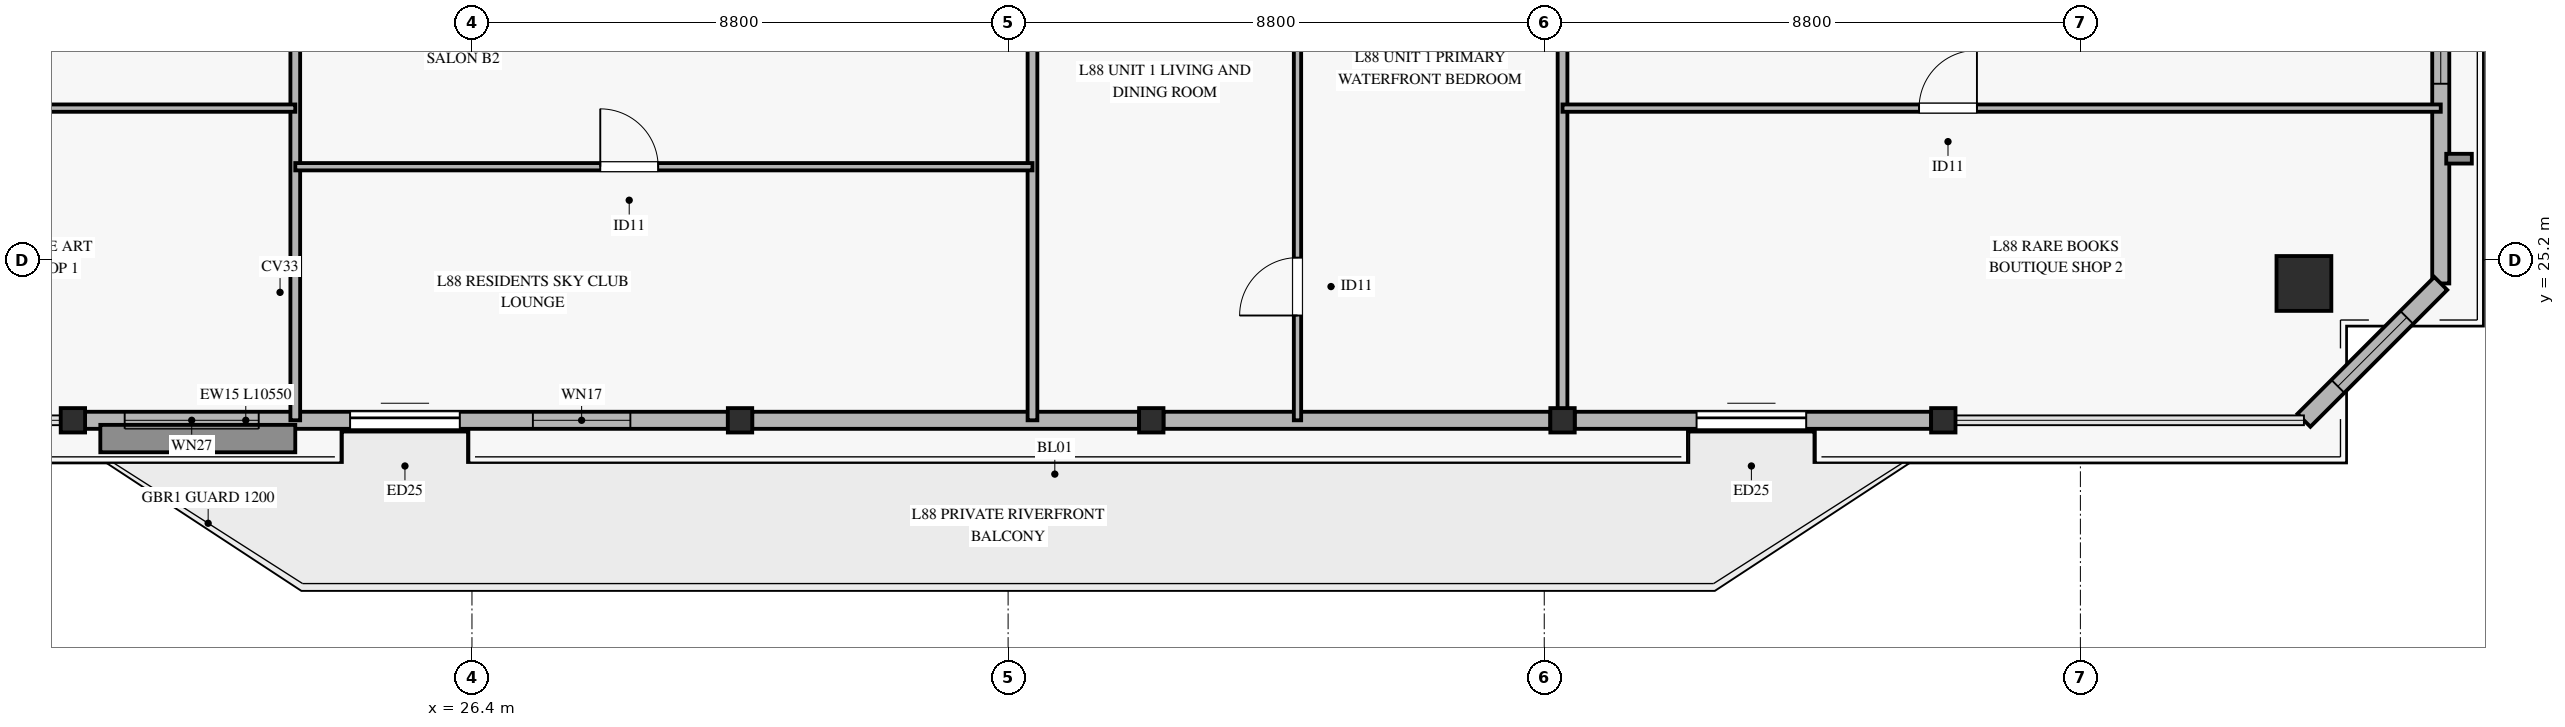
"""IFC4 building model, lengths in metres.
Left out: names, types, materials, properties, quantities, classifications, styles, units other than length and angle.
Written with IfcOpenShell. Run it as: python <this file> out.ifc"""

import sys

from ifc_helpers import new_model, si_unit, direction, frame, frame_2d, origin, origin_2d, place, context, subcontext, project, spatial, rectangle, hollow_rectangle, extrude, source, transform, mapped, element, fill, save


model = new_model("IFC4")
c1 = context("Model", 3, precision=1e-05, world=origin(), true_north=direction((0.0, 1.0)))
c2 = subcontext(c1, "Body", "Model", "MODEL_VIEW")
j1 = project(units=[si_unit("LENGTHUNIT", "METRE"), si_unit("PLANEANGLEUNIT", "RADIAN")], contexts=[c1])
p1 = place(None, origin())
s1 = spatial("IfcSite", under=j1, at=p1, CompositionType="ELEMENT")
p2 = place(p1, origin())
s2 = spatial("IfcBuilding", under=s1, at=p2, CompositionType="ELEMENT")
p3 = place(p2, frame((0.0, 0.0, 339.1)))
s3 = spatial("IfcBuildingStorey", under=s2, at=p3, CompositionType="ELEMENT", Elevation=339.1)
m1 = source(origin(), c2, "Body", "SweptSolid", [
    extrude(hollow_rectangle(XDim=0.9, YDim=0.9, WallThickness=0.04, at=origin_2d()), origin(), (0.0, 0.0, 1.0), 3.185),
])
p4 = place(p3, frame((56.469, 24.814, 0.0), z_axis=(0.0, 0.0, 1.0), x_axis=(1.0, 0.0, 0.0)))
e1 = element("IfcColumn", 1, at=p4, inside=s3, PredefinedType="COLUMN", context=c2, shape_type="MappedRepresentation", body=[
    mapped(m1, transform((0.0, 0.0, 0.0), x_axis=(1.0, 0.0, 0.0), y_axis=(0.0, 1.0, 0.0), z_axis=(0.0, 0.0, 1.0), scale=1.0)),
])
m2 = source(origin(), c2, "Body", "SweptSolid", [
    extrude(hollow_rectangle(XDim=0.4, YDim=0.4, WallThickness=0.02, at=origin_2d()), origin(), (0.0, 0.0, 1.0), 3.185),
])
for number, where, z_axis, x_axis in (
    (2, (19.85, 22.568, 0.0), (0.0, 0.0, 1.0), (1.0, 0.0, 0.0)),
    (3, (30.8, 22.568, 0.0), (0.0, 0.0, 1.0), (1.0, 0.0, 0.0)),
    (4, (37.55, 22.568, 0.0), (0.0, 0.0, 1.0), (1.0, 0.0, 0.0)),
    (5, (44.3, 22.568, 0.0), (0.0, 0.0, 1.0), (1.0, 0.0, 0.0)),
    (6, (50.55, 22.568, 0.0), (0.0, 0.0, 1.0), (1.0, 0.0, 0.0)),
):
    element("IfcColumn", number, at=place(p3, frame(where, z_axis=z_axis, x_axis=x_axis)), inside=s3, PredefinedType="COLUMN", context=c2, shape_type="MappedRepresentation", body=[
        mapped(m2, transform((0.0, 0.0, 0.0), x_axis=(1.0, 0.0, 0.0), y_axis=(0.0, 1.0, 0.0), z_axis=(0.0, 0.0, 1.0), scale=1.0)),
    ])
p5 = place(p3, frame((20.05, 22.568, 0.0), z_axis=(0.0, 0.0, 1.0), x_axis=(1.0, 0.0, 0.0)))
e7 = element("IfcWall", 7, at=p5, inside=s3, PredefinedType="SOLIDWALL", context=c2, shape_type="SweptSolid", body=[
    extrude(rectangle(XDim=10.55, YDim=0.28, at=frame_2d((5.275, 0.0))), origin(), (0.0, 0.0, 1.0), 2.815),
])
p6 = place(p5, frame((4.35, 0.0, 0.0)))
e8 = element("IfcOpeningElement", 8, at=p6, cuts=e7, PredefinedType="OPENING", context=c2, shape_type="SweptSolid", body=[
    extrude(rectangle(XDim=1.8, YDim=2.25, at=frame_2d((0.9, 1.125))), frame((0.0, 0.15, 0.0), z_axis=(0.0, -1.0, 0.0), x_axis=(1.0, 0.0, 0.0)), (0.0, 0.0, 1.0), 0.3),
])
p7 = place(p5, frame((0.65, 0.0, 0.45)))
e9 = element("IfcOpeningElement", 9, at=p7, cuts=e7, PredefinedType="OPENING", context=c2, shape_type="SweptSolid", body=[
    extrude(rectangle(XDim=2.2, YDim=2.1, at=frame_2d((1.1, 1.05))), frame((0.0, 0.15, 0.0), z_axis=(0.0, -1.0, 0.0), x_axis=(1.0, 0.0, 0.0)), (0.0, 0.0, 1.0), 0.3),
])
p8 = place(p5, frame((7.35, 0.0, 0.45)))
e10 = element("IfcOpeningElement", 10, at=p8, cuts=e7, PredefinedType="OPENING", context=c2, shape_type="SweptSolid", body=[
    extrude(rectangle(XDim=1.6, YDim=2.0, at=frame_2d((0.8, 1.0))), frame((0.0, 0.15, 0.0), z_axis=(0.0, -1.0, 0.0), x_axis=(1.0, 0.0, 0.0)), (0.0, 0.0, 1.0), 0.3),
])
for number, where, z_axis, x_axis in (
    (11, (31.0, 22.568, 0.0), (0.0, 0.0, 1.0), (1.0, 0.0, 0.0)),
    (12, (37.75, 22.568, 0.0), (0.0, 0.0, 1.0), (1.0, 0.0, 0.0)),
):
    element("IfcWall", number, at=place(p3, frame(where, z_axis=z_axis, x_axis=x_axis)), inside=s3, PredefinedType="SOLIDWALL", context=c2, shape_type="SweptSolid", body=[
        extrude(rectangle(XDim=6.35, YDim=0.28, at=frame_2d((3.175, 0.0))), origin(), (0.0, 0.0, 1.0), 2.815),
    ])
p9 = place(p3, frame((44.5, 22.568, 0.0), z_axis=(0.0, 0.0, 1.0), x_axis=(1.0, 0.0, 0.0)))
e13 = element("IfcWall", 13, at=p9, inside=s3, PredefinedType="SOLIDWALL", context=c2, shape_type="SweptSolid", body=[
    extrude(rectangle(XDim=5.85, YDim=0.28, at=frame_2d((2.925, 0.0))), origin(), (0.0, 0.0, 1.0), 2.815),
])
p10 = place(p9, frame((2.0, 0.0, 0.0)))
e14 = element("IfcOpeningElement", 14, at=p10, cuts=e13, PredefinedType="OPENING", context=c2, shape_type="SweptSolid", body=[
    extrude(rectangle(XDim=1.8, YDim=2.25, at=frame_2d((0.9, 1.125))), frame((0.0, 0.15, 0.0), z_axis=(0.0, -1.0, 0.0), x_axis=(1.0, 0.0, 0.0)), (0.0, 0.0, 1.0), 0.3),
])
p11 = place(p3, frame((58.715, 24.814, 0.0), z_axis=(0.0, 0.0, 1.0), x_axis=(0.0, 1.0, 0.0)))
e15 = element("IfcWall", 15, at=p11, inside=s3, PredefinedType="SOLIDWALL", context=c2, shape_type="SweptSolid", body=[
    extrude(rectangle(XDim=9.32, YDim=0.28, at=frame_2d((4.66, 0.0))), origin(), (0.0, 0.0, 1.0), 2.815),
])
p12 = place(p11, frame((3.278, 0.0, 0.45)))
e16 = element("IfcOpeningElement", 16, at=p12, cuts=e15, PredefinedType="OPENING", context=c2, shape_type="SweptSolid", body=[
    extrude(rectangle(XDim=2.2, YDim=2.1, at=frame_2d((1.1, 1.05))), frame((0.0, 0.15, 0.0), z_axis=(0.0, -1.0, 0.0), x_axis=(1.0, 0.0, 0.0)), (0.0, 0.0, 1.0), 0.3),
])
p13 = place(p3, frame((56.469, 22.568, 0.0), z_axis=(0.0, 0.0, 1.0), x_axis=(0.707145211947, 0.707068348337, 0.0)))
e17 = element("IfcWall", 17, at=p13, inside=s3, PredefinedType="SOLIDWALL", context=c2, shape_type="SweptSolid", body=[
    extrude(rectangle(XDim=3.176, YDim=0.3, at=frame_2d((1.588, 0.0))), origin(), (0.0, 0.0, 1.0), 2.815),
])
p14 = place(p13, frame((0.788, 0.0, 0.45)))
e18 = element("IfcOpeningElement", 18, at=p14, cuts=e17, PredefinedType="OPENING", context=c2, shape_type="SweptSolid", body=[
    extrude(rectangle(XDim=1.6, YDim=2.0, at=frame_2d((0.8, 1.0))), frame((0.0, 0.16, 0.0), z_axis=(0.0, -1.0, 0.0), x_axis=(1.0, 0.0, 0.0)), (0.0, 0.0, 1.0), 0.32),
])
p15 = place(p3, frame((23.5, 22.568, 0.0), z_axis=(0.0, 0.0, 1.0), x_axis=(0.0, 1.0, 0.0)))
e19 = element("IfcWall", 19, at=p15, inside=s3, PredefinedType="PARTITIONING", context=c2, shape_type="SweptSolid", body=[
    extrude(rectangle(XDim=14.882, YDim=0.16, at=frame_2d((7.441, 0.0))), origin(), (0.0, 0.0, 1.0), 2.77),
])
p16 = place(p15, frame((12.352, 0.0, 0.0)))
e20 = element("IfcOpeningElement", 20, at=p16, cuts=e19, PredefinedType="OPENING", context=c2, shape_type="SweptSolid", body=[
    extrude(rectangle(XDim=1.05, YDim=2.15, at=frame_2d((0.525, 1.075))), frame((0.0, 0.09, 0.0), z_axis=(0.0, -1.0, 0.0), x_axis=(1.0, 0.0, 0.0)), (0.0, 0.0, 1.0), 0.18),
])
p17 = place(p3, frame((35.6, 22.568, 0.0), z_axis=(0.0, 0.0, 1.0), x_axis=(0.0, 1.0, 0.0)))
e21 = element("IfcWall", 21, at=p17, inside=s3, PredefinedType="PARTITIONING", context=c2, shape_type="SweptSolid", body=[
    extrude(rectangle(XDim=11.932, YDim=0.16, at=frame_2d((5.966, 0.0))), origin(), (0.0, 0.0, 1.0), 2.77),
])
p18 = place(p3, frame((44.3, 22.568, 0.0), z_axis=(0.0, 0.0, 1.0), x_axis=(0.0, 1.0, 0.0)))
e22 = element("IfcWall", 22, at=p18, inside=s3, PredefinedType="PARTITIONING", context=c2, shape_type="SweptSolid", body=[
    extrude(rectangle(XDim=14.882, YDim=0.16, at=frame_2d((7.441, 0.0))), origin(), (0.0, 0.0, 1.0), 2.47),
])
p19 = place(p18, frame((12.352, 0.0, 0.0)))
e23 = element("IfcOpeningElement", 23, at=p19, cuts=e22, PredefinedType="OPENING", context=c2, shape_type="SweptSolid", body=[
    extrude(rectangle(XDim=1.05, YDim=2.15, at=frame_2d((0.525, 1.075))), frame((0.0, 0.09, 0.0), z_axis=(0.0, -1.0, 0.0), x_axis=(1.0, 0.0, 0.0)), (0.0, 0.0, 1.0), 0.18),
])
p20 = place(p3, frame((11.685, 27.692, 0.0), z_axis=(0.0, 0.0, 1.0), x_axis=(1.0, 0.0, 0.0)))
e24 = element("IfcWall", 24, at=p20, inside=s3, PredefinedType="PARTITIONING", context=c2, shape_type="SweptSolid", body=[
    extrude(rectangle(XDim=11.815, YDim=0.12, at=frame_2d((5.907, 0.0))), origin(), (0.0, 0.0, 1.0), 2.47),
])
p21 = place(p20, frame((5.012, 0.0, 0.0)))
e25 = element("IfcOpeningElement", 25, at=p21, cuts=e24, PredefinedType="OPENING", context=c2, shape_type="SweptSolid", body=[
    extrude(rectangle(XDim=0.95, YDim=2.1, at=frame_2d((0.475, 1.05))), frame((0.0, 0.07, 0.0), z_axis=(0.0, -1.0, 0.0), x_axis=(1.0, 0.0, 0.0)), (0.0, 0.0, 1.0), 0.14),
])
p22 = place(p3, frame((23.5, 26.73, 0.0), z_axis=(0.0, 0.0, 1.0), x_axis=(1.0, 0.0, 0.0)))
e26 = element("IfcWall", 26, at=p22, inside=s3, PredefinedType="PARTITIONING", context=c2, shape_type="SweptSolid", body=[
    extrude(rectangle(XDim=12.1, YDim=0.12, at=frame_2d((6.05, 0.0))), origin(), (0.0, 0.0, 1.0), 2.47),
])
p23 = place(p22, frame((5.006, 0.0, 0.0)))
e27 = element("IfcOpeningElement", 27, at=p23, cuts=e26, PredefinedType="OPENING", context=c2, shape_type="SweptSolid", body=[
    extrude(rectangle(XDim=0.95, YDim=2.1, at=frame_2d((0.475, 1.05))), frame((0.0, 0.07, 0.0), z_axis=(0.0, -1.0, 0.0), x_axis=(1.0, 0.0, 0.0)), (0.0, 0.0, 1.0), 0.14),
])
p24 = place(p3, frame((39.95, 22.568, 0.0), z_axis=(0.0, 0.0, 1.0), x_axis=(0.0, 1.0, 0.0)))
e28 = element("IfcWall", 28, at=p24, inside=s3, PredefinedType="PARTITIONING", context=c2, shape_type="SweptSolid", body=[
    extrude(rectangle(XDim=9.282, YDim=0.12, at=frame_2d((4.641, 0.0))), origin(), (0.0, 0.0, 1.0), 2.77),
])
p25 = place(p24, frame((1.72, 0.0, 0.0)))
e29 = element("IfcOpeningElement", 29, at=p25, cuts=e28, PredefinedType="OPENING", context=c2, shape_type="SweptSolid", body=[
    extrude(rectangle(XDim=0.95, YDim=2.1, at=frame_2d((0.475, 1.05))), frame((0.0, 0.07, 0.0), z_axis=(0.0, -1.0, 0.0), x_axis=(1.0, 0.0, 0.0)), (0.0, 0.0, 1.0), 0.14),
])
p26 = place(p3, frame((44.3, 27.692, 0.0), z_axis=(0.0, 0.0, 1.0), x_axis=(1.0, 0.0, 0.0)))
e30 = element("IfcWall", 30, at=p26, inside=s3, PredefinedType="PARTITIONING", context=c2, shape_type="SweptSolid", body=[
    extrude(rectangle(XDim=14.415, YDim=0.12, at=frame_2d((7.208, 0.0))), origin(), (0.0, 0.0, 1.0), 2.47),
])
p27 = place(p26, frame((5.852, 0.0, 0.0)))
e31 = element("IfcOpeningElement", 31, at=p27, cuts=e30, PredefinedType="OPENING", context=c2, shape_type="SweptSolid", body=[
    extrude(rectangle(XDim=0.95, YDim=2.1, at=frame_2d((0.475, 1.05))), frame((0.0, 0.07, 0.0), z_axis=(0.0, -1.0, 0.0), x_axis=(1.0, 0.0, 0.0)), (0.0, 0.0, 1.0), 0.14),
])
m3 = source(origin(), c2, "Body", "SweptSolid", [
    extrude(rectangle(XDim=1.8, YDim=2.25, at=frame_2d((0.9, 1.125))), frame((0.0, 0.025, 0.0), z_axis=(0.0, -1.0, 0.0), x_axis=(1.0, 0.0, 0.0)), (0.0, 0.0, 1.0), 0.05),
])
p28 = place(p6, origin())
e32 = element("IfcDoor", 32, at=p28, inside=s3, OperationType="SLIDING_TO_LEFT", PredefinedType="DOOR", context=c2, shape_type="MappedRepresentation", body=[
    mapped(m3, transform((0.0, 0.0, 0.0), x_axis=(1.0, 0.0, 0.0), y_axis=(0.0, 1.0, 0.0), z_axis=(0.0, 0.0, 1.0), scale=1.0)),
])
fill(e8, e32)
m4 = source(origin(), c2, "Body", "SweptSolid", [
    extrude(rectangle(XDim=2.2, YDim=2.1, at=frame_2d((1.1, 1.05))), frame((0.0, 0.03, 0.0), z_axis=(0.0, -1.0, 0.0), x_axis=(1.0, 0.0, 0.0)), (0.0, 0.0, 1.0), 0.06),
])
p29 = place(p7, origin())
e33 = element("IfcWindow", 33, at=p29, inside=s3, PartitioningType="SINGLE_PANEL", PredefinedType="WINDOW", context=c2, shape_type="MappedRepresentation", body=[
    mapped(m4, transform((0.0, 0.0, 0.0), x_axis=(1.0, 0.0, 0.0), y_axis=(0.0, 1.0, 0.0), z_axis=(0.0, 0.0, 1.0), scale=1.0)),
])
fill(e9, e33)
m5 = source(origin(), c2, "Body", "SweptSolid", [
    extrude(rectangle(XDim=1.6, YDim=2.0, at=frame_2d((0.8, 1.0))), frame((0.0, 0.03, 0.0), z_axis=(0.0, -1.0, 0.0), x_axis=(1.0, 0.0, 0.0)), (0.0, 0.0, 1.0), 0.06),
])
p30 = place(p8, origin())
e34 = element("IfcWindow", 34, at=p30, inside=s3, PartitioningType="SINGLE_PANEL", PredefinedType="WINDOW", context=c2, shape_type="MappedRepresentation", body=[
    mapped(m5, transform((0.0, 0.0, 0.0), x_axis=(1.0, 0.0, 0.0), y_axis=(0.0, 1.0, 0.0), z_axis=(0.0, 0.0, 1.0), scale=1.0)),
])
fill(e10, e34)
p31 = place(p10, origin())
e35 = element("IfcDoor", 35, at=p31, inside=s3, OperationType="SLIDING_TO_LEFT", PredefinedType="DOOR", context=c2, shape_type="MappedRepresentation", body=[
    mapped(m3, transform((0.0, 0.0, 0.0), x_axis=(1.0, 0.0, 0.0), y_axis=(0.0, 1.0, 0.0), z_axis=(0.0, 0.0, 1.0), scale=1.0)),
])
fill(e14, e35)
p32 = place(p12, origin())
e36 = element("IfcWindow", 36, at=p32, inside=s3, PartitioningType="SINGLE_PANEL", PredefinedType="WINDOW", context=c2, shape_type="MappedRepresentation", body=[
    mapped(m4, transform((0.0, 0.0, 0.0), x_axis=(1.0, 0.0, 0.0), y_axis=(0.0, 1.0, 0.0), z_axis=(0.0, 0.0, 1.0), scale=1.0)),
])
fill(e16, e36)
p33 = place(p14, origin())
e37 = element("IfcWindow", 37, at=p33, inside=s3, PartitioningType="SINGLE_PANEL", PredefinedType="WINDOW", context=c2, shape_type="MappedRepresentation", body=[
    mapped(m5, transform((0.0, 0.0, 0.0), x_axis=(1.0, 0.0, 0.0), y_axis=(0.0, 1.0, 0.0), z_axis=(0.0, 0.0, 1.0), scale=1.0)),
])
fill(e18, e37)
m6 = source(origin(), c2, "Body", "SweptSolid", [
    extrude(rectangle(XDim=0.95, YDim=2.1, at=frame_2d((0.475, 1.05))), frame((0.0, 0.025, 0.0), z_axis=(0.0, -1.0, 0.0), x_axis=(1.0, 0.0, 0.0)), (0.0, 0.0, 1.0), 0.05),
])
p34 = place(p23, origin())
e38 = element("IfcDoor", 38, at=p34, inside=s3, OperationType="SINGLE_SWING_LEFT", PredefinedType="DOOR", context=c2, shape_type="MappedRepresentation", body=[
    mapped(m6, transform((0.0, 0.0, 0.0), x_axis=(1.0, 0.0, 0.0), y_axis=(0.0, 1.0, 0.0), z_axis=(0.0, 0.0, 1.0), scale=1.0)),
])
fill(e27, e38)
p35 = place(p25, origin())
e39 = element("IfcDoor", 39, at=p35, inside=s3, OperationType="SINGLE_SWING_LEFT", PredefinedType="DOOR", context=c2, shape_type="MappedRepresentation", body=[
    mapped(m6, transform((0.0, 0.0, 0.0), x_axis=(1.0, 0.0, 0.0), y_axis=(0.0, 1.0, 0.0), z_axis=(0.0, 0.0, 1.0), scale=1.0)),
])
fill(e29, e39)
p36 = place(p27, origin())
e40 = element("IfcDoor", 40, at=p36, inside=s3, OperationType="SINGLE_SWING_RIGHT", PredefinedType="DOOR", context=c2, shape_type="MappedRepresentation", body=[
    mapped(m6, transform((0.0, 0.0, 0.0), x_axis=(1.0, 0.0, 0.0), y_axis=(0.0, 1.0, 0.0), z_axis=(0.0, 0.0, 1.0), scale=1.0)),
])
fill(e31, e40)
save(model, sys.argv[1])
